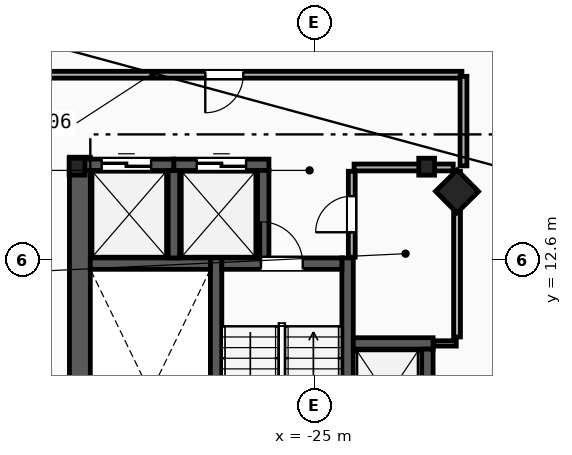
"""IFC4 building model, lengths in metres.
Left out: names, types, materials, properties, quantities, classifications, styles, units other than length and angle.
Written with IfcOpenShell. Run it as: python <this file> out.ifc"""

import sys

from ifc_helpers import new_model, si_unit, direction, frame, frame_2d, origin, origin_2d, place, context, subcontext, project, spatial, rectangle, i_section, extrude, element, fill, save


model = new_model("IFC4")
c1 = context("Model", 3, precision=1e-05, world=origin(), true_north=direction((0.0, 1.0)))
c2 = subcontext(c1, "Body", "Model", "MODEL_VIEW")
j1 = project(units=[si_unit("LENGTHUNIT", "METRE"), si_unit("PLANEANGLEUNIT", "RADIAN")], contexts=[c1])
p1 = place(None, origin())
s1 = spatial("IfcSite", under=j1, at=p1, CompositionType="ELEMENT")
p2 = place(p1, origin())
s2 = spatial("IfcBuilding", under=s1, at=p2, CompositionType="ELEMENT")
p3 = place(p2, frame((0.0, 0.0, 254.0)))
s3 = spatial("IfcBuildingStorey", under=s2, at=p3, CompositionType="ELEMENT", Elevation=254.0)
for number, where, z_axis, x_axis in (
    (1, (-22.05, 15.05, 0.0), (0.0, 0.0, 1.0), (1.0, 0.0, 0.0)),
    (2, (-31.25, 15.05, 0.0), (0.0, 0.0, 1.0), (1.0, 0.0, 0.0)),
):
    element("IfcColumn", number, at=place(p3, frame(where, z_axis=z_axis, x_axis=x_axis)), inside=s3, PredefinedType="COLUMN", context=c2, shape_type="SweptSolid", body=[
        extrude(i_section(OverallWidth=0.416, OverallDepth=0.446, WebThickness=0.039, FlangeThickness=0.063, FilletRadius=0.018, at=origin_2d()), origin(), (0.0, 0.0, 1.0), 3.6),
    ])
p4 = place(p3, frame((-21.25, 14.4, 0.0), z_axis=(0.0, 0.0, 1.0), x_axis=(-0.703270634186, 0.710922228581, 0.0)))
e3 = element("IfcColumn", 3, at=p4, inside=s3, PredefinedType="COLUMN", context=c2, shape_type="SweptSolid", body=[
    extrude(rectangle(XDim=0.8, YDim=0.8, at=origin_2d()), origin(), (0.0, 0.0, 1.0), 3.6),
])
p5 = place(p3, frame((-31.175, 1.97, 0.0), z_axis=(0.0, 0.0, 1.0), x_axis=(0.0, 1.0, 0.0)))
e4 = element("IfcWall", 4, at=p5, inside=s3, PredefinedType="SHEAR", context=c2, shape_type="SweptSolid", body=[
    extrude(rectangle(XDim=13.33, YDim=0.55, at=frame_2d((6.665, 0.0))), origin(), (0.0, 0.0, 1.0), 3.34),
])
for number, where, z_axis, x_axis in (
    (5, (-27.59, 1.97, 0.0), (0.0, 0.0, 1.0), (0.0, 1.0, 0.0)),
    (6, (-24.13, 1.97, 0.0), (0.0, 0.0, 1.0), (0.0, 1.0, 0.0)),
):
    element("IfcWall", number, at=place(p3, frame(where, z_axis=z_axis, x_axis=x_axis)), inside=s3, PredefinedType="SHEAR", context=c2, shape_type="SweptSolid", body=[
        extrude(rectangle(XDim=10.68, YDim=0.3, at=frame_2d((5.34, 0.0))), origin(), (0.0, 0.0, 1.0), 3.34),
    ])
p6 = place(p3, frame((-30.9, 12.5, 0.0), z_axis=(0.0, 0.0, 1.0), x_axis=(1.0, 0.0, 0.0)))
e7 = element("IfcWall", 7, at=p6, inside=s3, PredefinedType="SHEAR", context=c2, shape_type="SweptSolid", body=[
    extrude(rectangle(XDim=3.16, YDim=0.3, at=frame_2d((1.58, 0.0))), origin(), (0.0, 0.0, 1.0), 3.34),
])
p7 = place(p3, frame((-27.44, 12.5, 0.0), z_axis=(0.0, 0.0, 1.0), x_axis=(1.0, 0.0, 0.0)))
e8 = element("IfcWall", 8, at=p7, inside=s3, PredefinedType="SHEAR", context=c2, shape_type="SweptSolid", body=[
    extrude(rectangle(XDim=3.16, YDim=0.3, at=frame_2d((1.58, 0.0))), origin(), (0.0, 0.0, 1.0), 3.34),
])
p8 = place(p7, frame((1.03, 0.0, 0.0)))
e9 = element("IfcOpeningElement", 9, at=p8, cuts=e8, PredefinedType="OPENING", context=c2, shape_type="SweptSolid", body=[
    extrude(rectangle(XDim=1.1, YDim=2.15, at=frame_2d((0.55, 1.075))), frame((0.0, 0.16, 0.0), z_axis=(0.0, -1.0, 0.0), x_axis=(1.0, 0.0, 0.0)), (0.0, 0.0, 1.0), 0.32),
])
p9 = place(p3, frame((-23.98, 10.4, 0.0), z_axis=(0.0, 0.0, 1.0), x_axis=(1.0, 0.0, 0.0)))
e10 = element("IfcWall", 10, at=p9, inside=s3, PredefinedType="SHEAR", context=c2, shape_type="SweptSolid", body=[
    extrude(rectangle(XDim=2.1, YDim=0.3, at=frame_2d((1.05, 0.0))), origin(), (0.0, 0.0, 1.0), 3.34),
])
p10 = place(p3, frame((-22.03, 7.75, 0.0), z_axis=(0.0, 0.0, 1.0), x_axis=(0.0, 1.0, 0.0)))
e11 = element("IfcWall", 11, at=p10, inside=s3, PredefinedType="SHEAR", context=c2, shape_type="SweptSolid", body=[
    extrude(rectangle(XDim=2.5, YDim=0.3, at=frame_2d((1.25, 0.0))), origin(), (0.0, 0.0, 1.0), 3.34),
])
p11 = place(p3, frame((-31.2, 15.1, 0.0), z_axis=(0.0, 0.0, 1.0), x_axis=(1.0, 0.0, 0.0)))
e12 = element("IfcWall", 12, at=p11, inside=s3, PredefinedType="SHEAR", context=c2, shape_type="SweptSolid", body=[
    extrude(rectangle(XDim=2.5, YDim=0.3, at=frame_2d((1.25, 0.0))), origin(), (0.0, 0.0, 1.0), 3.34),
])
p12 = place(p11, frame((0.6, 0.0, 0.0)))
e13 = element("IfcOpeningElement", 13, at=p12, cuts=e12, PredefinedType="OPENING", context=c2, shape_type="SweptSolid", body=[
    extrude(rectangle(XDim=1.3, YDim=2.2, at=frame_2d((0.65, 1.1))), frame((0.0, 0.16, 0.0), z_axis=(0.0, -1.0, 0.0), x_axis=(1.0, 0.0, 0.0)), (0.0, 0.0, 1.0), 0.32),
])
p13 = place(p3, frame((-28.7, 12.65, 0.0), z_axis=(0.0, 0.0, 1.0), x_axis=(0.0, 1.0, 0.0)))
e14 = element("IfcWall", 14, at=p13, inside=s3, PredefinedType="SHEAR", context=c2, shape_type="SweptSolid", body=[
    extrude(rectangle(XDim=2.3, YDim=0.3, at=frame_2d((1.15, 0.0))), origin(), (0.0, 0.0, 1.0), 3.34),
])
p14 = place(p3, frame((-28.7, 15.1, 0.0), z_axis=(0.0, 0.0, 1.0), x_axis=(1.0, 0.0, 0.0)))
e15 = element("IfcWall", 15, at=p14, inside=s3, PredefinedType="SHEAR", context=c2, shape_type="SweptSolid", body=[
    extrude(rectangle(XDim=2.5, YDim=0.3, at=frame_2d((1.25, 0.0))), origin(), (0.0, 0.0, 1.0), 3.34),
])
p15 = place(p14, frame((0.6, 0.0, 0.0)))
e16 = element("IfcOpeningElement", 16, at=p15, cuts=e15, PredefinedType="OPENING", context=c2, shape_type="SweptSolid", body=[
    extrude(rectangle(XDim=1.3, YDim=2.2, at=frame_2d((0.65, 1.1))), frame((0.0, 0.16, 0.0), z_axis=(0.0, -1.0, 0.0), x_axis=(1.0, 0.0, 0.0)), (0.0, 0.0, 1.0), 0.32),
])
p16 = place(p3, frame((-26.35, 12.65, 0.0), z_axis=(0.0, 0.0, 1.0), x_axis=(0.0, 1.0, 0.0)))
e17 = element("IfcWall", 17, at=p16, inside=s3, PredefinedType="SHEAR", context=c2, shape_type="SweptSolid", body=[
    extrude(rectangle(XDim=2.3, YDim=0.3, at=frame_2d((1.15, 0.0))), origin(), (0.0, 0.0, 1.0), 3.34),
])
p17 = place(p3, frame((-21.86, 10.4, 0.0), z_axis=(0.0, 0.0, 1.0), x_axis=(1.0, 0.0, 0.0)))
e18 = element("IfcWall", 18, at=p17, inside=s3, PredefinedType="PARTITIONING", context=c2, shape_type="SweptSolid", body=[
    extrude(rectangle(XDim=0.59, YDim=0.14, at=frame_2d((0.295, 0.0))), origin(), (0.0, 0.0, 1.0), 3.34),
])
p18 = place(p3, frame((-21.25, 10.57, 0.0), z_axis=(0.0, 0.0, 1.0), x_axis=(0.0, 1.0, 0.0)))
e19 = element("IfcWall", 19, at=p18, inside=s3, PredefinedType="PARTITIONING", context=c2, shape_type="SweptSolid", body=[
    extrude(rectangle(XDim=4.36, YDim=0.18, at=frame_2d((2.18, 0.0))), origin(), (0.0, 0.0, 1.0), 3.34),
])
p19 = place(p3, frame((-23.96, 15.03, 0.0), z_axis=(0.0, 0.0, 1.0), x_axis=(1.0, 0.0, 0.0)))
e20 = element("IfcWall", 20, at=p19, inside=s3, PredefinedType="PARTITIONING", context=c2, shape_type="SweptSolid", body=[
    extrude(rectangle(XDim=2.61, YDim=0.18, at=frame_2d((1.305, 0.0))), origin(), (0.0, 0.0, 1.0), 2.413),
])
p20 = place(p3, frame((-24.02, 12.67, 0.0), z_axis=(0.0, 0.0, 1.0), x_axis=(0.0, 1.0, 0.0)))
e21 = element("IfcWall", 21, at=p20, inside=s3, PredefinedType="PARTITIONING", context=c2, shape_type="SweptSolid", body=[
    extrude(rectangle(XDim=2.26, YDim=0.18, at=frame_2d((1.13, 0.0))), origin(), (0.0, 0.0, 1.0), 3.34),
])
p21 = place(p20, frame((0.655, 0.0, 0.0)))
e22 = element("IfcOpeningElement", 22, at=p21, cuts=e21, PredefinedType="OPENING", context=c2, shape_type="SweptSolid", body=[
    extrude(rectangle(XDim=0.95, YDim=2.1, at=frame_2d((0.475, 1.05))), frame((0.0, 0.1, 0.0), z_axis=(0.0, -1.0, 0.0), x_axis=(1.0, 0.0, 0.0)), (0.0, 0.0, 1.0), 0.2),
])
p22 = place(p3, frame((-21.122, 17.47, 0.0), z_axis=(0.0, 0.0, 1.0), x_axis=(-1.0, 0.0, 0.0)))
e23 = element("IfcWall", 23, at=p22, inside=s3, PredefinedType="PARTITIONING", context=c2, shape_type="SweptSolid", body=[
    extrude(rectangle(XDim=12.507, YDim=0.18, at=frame_2d((6.253, 0.0))), origin(), (0.0, 0.0, 1.0), 3.34),
])
p23 = place(p22, frame((5.753, 0.0, 0.0)))
e24 = element("IfcOpeningElement", 24, at=p23, cuts=e23, PredefinedType="OPENING", context=c2, shape_type="SweptSolid", body=[
    extrude(rectangle(XDim=1.0, YDim=2.15, at=frame_2d((0.5, 1.075))), frame((0.0, 0.1, 0.0), z_axis=(0.0, -1.0, 0.0), x_axis=(1.0, 0.0, 0.0)), (0.0, 0.0, 1.0), 0.2),
])
p24 = place(p3, frame((-21.08, 15.072, 0.0), z_axis=(0.0, 0.0, 1.0), x_axis=(0.0, 1.0, 0.0)))
e25 = element("IfcWall", 25, at=p24, inside=s3, PredefinedType="PARTITIONING", context=c2, shape_type="SweptSolid", body=[
    extrude(rectangle(XDim=2.357, YDim=0.18, at=frame_2d((1.178, 0.0))), origin(), (0.0, 0.0, 1.0), 3.34),
])
p25 = place(p8, origin())
e26 = element("IfcDoor", 26, at=p25, inside=s3, OperationType="SINGLE_SWING_LEFT", PredefinedType="DOOR", context=c2, shape_type="SweptSolid", body=[
    extrude(rectangle(XDim=1.1, YDim=2.15, at=frame_2d((0.55, 1.075))), frame((0.0, 0.025, 0.0), z_axis=(0.0, -1.0, 0.0), x_axis=(1.0, 0.0, 0.0)), (0.0, 0.0, 1.0), 0.05),
])
fill(e9, e26)
p26 = place(p12, origin())
e27 = element("IfcDoor", 27, at=p26, inside=s3, OperationType="SLIDING_TO_LEFT", PredefinedType="TRAPDOOR", context=c2, shape_type="SweptSolid", body=[
    extrude(rectangle(XDim=1.3, YDim=2.2, at=frame_2d((0.65, 1.1))), frame((0.0, 0.025, 0.0), z_axis=(0.0, -1.0, 0.0), x_axis=(1.0, 0.0, 0.0)), (0.0, 0.0, 1.0), 0.05),
])
fill(e13, e27)
p27 = place(p15, origin())
e28 = element("IfcDoor", 28, at=p27, inside=s3, OperationType="SLIDING_TO_LEFT", PredefinedType="TRAPDOOR", context=c2, shape_type="SweptSolid", body=[
    extrude(rectangle(XDim=1.3, YDim=2.2, at=frame_2d((0.65, 1.1))), frame((0.0, 0.025, 0.0), z_axis=(0.0, -1.0, 0.0), x_axis=(1.0, 0.0, 0.0)), (0.0, 0.0, 1.0), 0.05),
])
fill(e16, e28)
p28 = place(p23, origin())
e29 = element("IfcDoor", 29, at=p28, inside=s3, OperationType="SINGLE_SWING_RIGHT", PredefinedType="DOOR", context=c2, shape_type="SweptSolid", body=[
    extrude(rectangle(XDim=1.0, YDim=2.15, at=frame_2d((0.5, 1.075))), frame((0.0, 0.025, 0.0), z_axis=(0.0, -1.0, 0.0), x_axis=(1.0, 0.0, 0.0)), (0.0, 0.0, 1.0), 0.05),
])
fill(e24, e29)
p29 = place(p21, origin())
e30 = element("IfcDoor", 30, at=p29, inside=s3, OperationType="SINGLE_SWING_LEFT", PredefinedType="DOOR", context=c2, shape_type="SweptSolid", body=[
    extrude(rectangle(XDim=0.95, YDim=2.1, at=frame_2d((0.475, 1.05))), frame((0.0, 0.025, 0.0), z_axis=(0.0, -1.0, 0.0), x_axis=(1.0, 0.0, 0.0)), (0.0, 0.0, 1.0), 0.05),
])
fill(e22, e30)
save(model, sys.argv[1])
